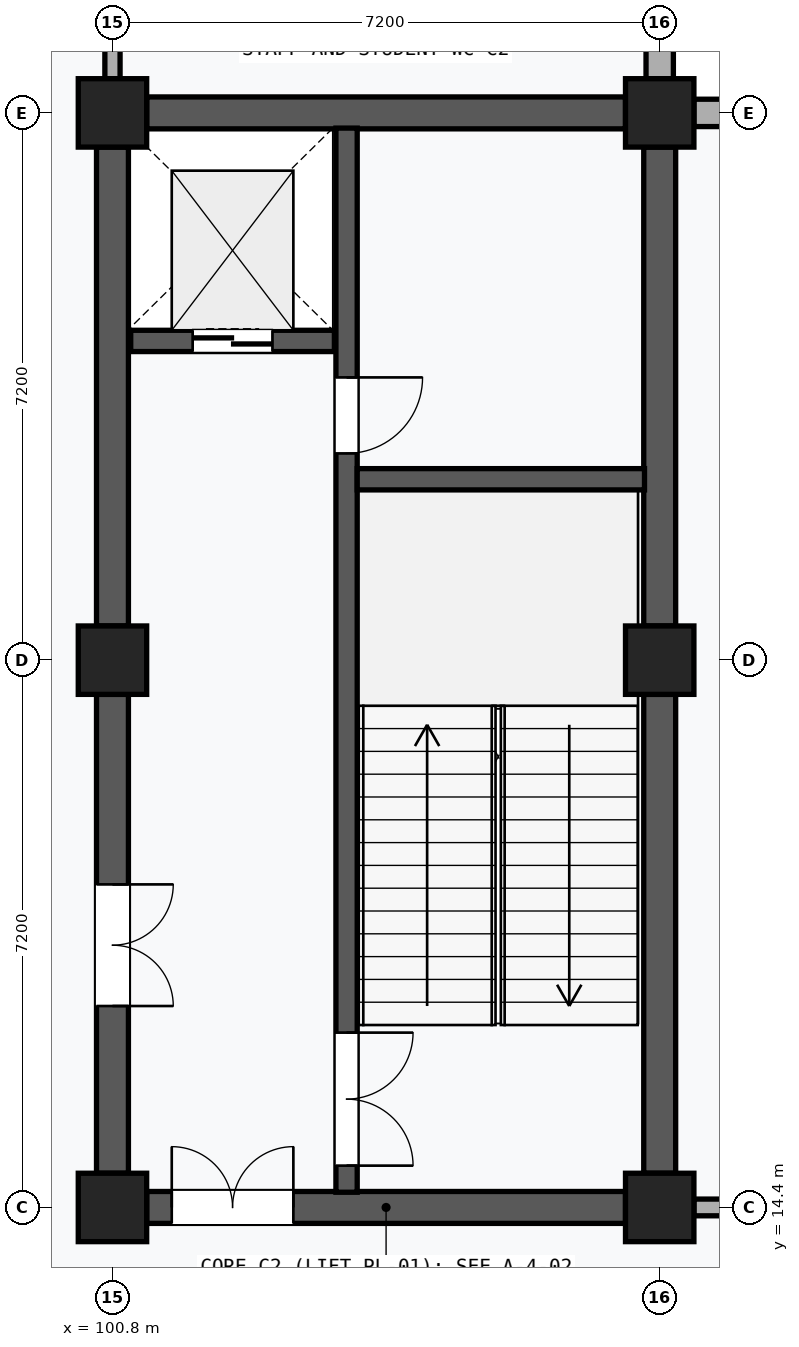
"""IFC4 building model, lengths in metres.
Left out: names, types, materials, properties, quantities, classifications, styles, units other than length and angle.
Written with IfcOpenShell. Run it as: python <this file> out.ifc"""

import sys

from ifc_helpers import new_model, si_unit, direction, frame, frame_2d, origin, origin_2d, place, context, subcontext, project, spatial, rectangle, extrude, element, fill, save


model = new_model("IFC4")
c1 = context("Model", 3, precision=1e-05, world=origin(), true_north=direction((0.0, 1.0)))
c2 = subcontext(c1, "Body", "Model", "MODEL_VIEW")
j1 = project(units=[si_unit("LENGTHUNIT", "METRE"), si_unit("PLANEANGLEUNIT", "RADIAN")], contexts=[c1])
p1 = place(None, origin())
s1 = spatial("IfcSite", under=j1, at=p1, CompositionType="ELEMENT")
p2 = place(p1, origin())
s2 = spatial("IfcBuilding", under=s1, at=p2, CompositionType="ELEMENT")
p3 = place(p2, frame((0.0, 0.0, 4.8)))
s3 = spatial("IfcBuildingStorey", under=s2, at=p3, CompositionType="ELEMENT", Elevation=4.8)
for number, where, z_axis, x_axis in (
    (1, (100.8, 14.4, 0.0), (0.0, 0.0, 1.0), (1.0, 0.0, 0.0)),
    (2, (100.8, 21.6, 0.0), (0.0, 0.0, 1.0), (1.0, 0.0, 0.0)),
    (3, (100.8, 28.8, 0.0), (0.0, 0.0, 1.0), (1.0, 0.0, 0.0)),
    (4, (108.0, 14.4, 0.0), (0.0, 0.0, 1.0), (1.0, 0.0, 0.0)),
    (5, (108.0, 21.6, 0.0), (0.0, 0.0, 1.0), (1.0, 0.0, 0.0)),
    (6, (108.0, 28.8, 0.0), (0.0, 0.0, 1.0), (1.0, 0.0, 0.0)),
):
    element("IfcColumn", number, at=place(p3, frame(where, z_axis=z_axis, x_axis=x_axis)), inside=s3, PredefinedType="COLUMN", context=c2, shape_type="SweptSolid", body=[
        extrude(rectangle(XDim=0.9, YDim=0.9, at=origin_2d()), origin(), (0.0, 0.0, 1.0), 4.8),
    ])
p4 = place(p3, frame((108.0, 29.25, 0.0), z_axis=(0.0, 0.0, 1.0), x_axis=(0.0, 1.0, 0.0)))
e7 = element("IfcWall", 7, at=p4, inside=s3, PredefinedType="SOLIDWALL", context=c2, shape_type="SweptSolid", body=[
    extrude(rectangle(XDim=6.375, YDim=0.36, at=frame_2d((3.188, 0.0))), origin(), (0.0, 0.0, 1.0), 3.85),
])
p5 = place(p4, frame((1.387, 0.0, 0.7)))
e8 = element("IfcOpeningElement", 8, at=p5, cuts=e7, PredefinedType="OPENING", context=c2, shape_type="SweptSolid", body=[
    extrude(rectangle(XDim=3.6, YDim=2.2, at=frame_2d((1.8, 1.1))), frame((0.0, 0.192, 0.0), z_axis=(0.0, -1.0, 0.0), x_axis=(1.0, 0.0, 0.0)), (0.0, 0.0, 1.0), 0.384),
])
p6 = place(p3, frame((108.45, 28.8, 0.0), z_axis=(0.0, 0.0, 1.0), x_axis=(1.0, 0.0, 0.0)))
e9 = element("IfcWall", 9, at=p6, inside=s3, PredefinedType="SOLIDWALL", context=c2, shape_type="SweptSolid", body=[
    extrude(rectangle(XDim=6.5, YDim=0.36, at=frame_2d((3.25, 0.0))), origin(), (0.0, 0.0, 1.0), 3.85),
])
p7 = place(p6, frame((1.45, 0.0, 0.7)))
e10 = element("IfcOpeningElement", 10, at=p7, cuts=e9, PredefinedType="OPENING", context=c2, shape_type="SweptSolid", body=[
    extrude(rectangle(XDim=3.6, YDim=2.2, at=frame_2d((1.8, 1.1))), frame((0.0, 0.192, 0.0), z_axis=(0.0, -1.0, 0.0), x_axis=(1.0, 0.0, 0.0)), (0.0, 0.0, 1.0), 0.384),
])
p8 = place(p3, frame((100.8, 14.85, 0.0), z_axis=(0.0, 0.0, 1.0), x_axis=(0.0, 1.0, 0.0)))
e11 = element("IfcWall", 11, at=p8, inside=s3, PredefinedType="SHEAR", context=c2, shape_type="SweptSolid", body=[
    extrude(rectangle(XDim=6.3, YDim=0.42, at=frame_2d((3.15, 0.0))), origin(), (0.0, 0.0, 1.0), 3.58),
])
p9 = place(p8, frame((2.2, 0.0, 0.0)))
e12 = element("IfcOpeningElement", 12, at=p9, cuts=e11, PredefinedType="OPENING", context=c2, shape_type="SweptSolid", body=[
    extrude(rectangle(XDim=1.6, YDim=2.2, at=frame_2d((0.8, 1.1))), frame((0.0, 0.222, 0.0), z_axis=(0.0, -1.0, 0.0), x_axis=(1.0, 0.0, 0.0)), (0.0, 0.0, 1.0), 0.444),
])
p10 = place(p3, frame((100.8, 22.05, 0.0), z_axis=(0.0, 0.0, 1.0), x_axis=(0.0, 1.0, 0.0)))
e13 = element("IfcWall", 13, at=p10, inside=s3, PredefinedType="SHEAR", context=c2, shape_type="SweptSolid", body=[
    extrude(rectangle(XDim=6.3, YDim=0.42, at=frame_2d((3.15, 0.0))), origin(), (0.0, 0.0, 1.0), 3.58),
])
p11 = place(p3, frame((108.0, 14.85, 0.0), z_axis=(0.0, 0.0, 1.0), x_axis=(0.0, 1.0, 0.0)))
e14 = element("IfcWall", 14, at=p11, inside=s3, PredefinedType="SHEAR", context=c2, shape_type="SweptSolid", body=[
    extrude(rectangle(XDim=6.3, YDim=0.42, at=frame_2d((3.15, 0.0))), origin(), (0.0, 0.0, 1.0), 3.58),
])
p12 = place(p3, frame((108.0, 22.05, 0.0), z_axis=(0.0, 0.0, 1.0), x_axis=(0.0, 1.0, 0.0)))
e15 = element("IfcWall", 15, at=p12, inside=s3, PredefinedType="SHEAR", context=c2, shape_type="SweptSolid", body=[
    extrude(rectangle(XDim=6.3, YDim=0.42, at=frame_2d((3.15, 0.0))), origin(), (0.0, 0.0, 1.0), 3.58),
])
p13 = place(p3, frame((101.25, 14.4, 0.0), z_axis=(0.0, 0.0, 1.0), x_axis=(1.0, 0.0, 0.0)))
e16 = element("IfcWall", 16, at=p13, inside=s3, PredefinedType="SHEAR", context=c2, shape_type="SweptSolid", body=[
    extrude(rectangle(XDim=6.3, YDim=0.42, at=frame_2d((3.15, 0.0))), origin(), (0.0, 0.0, 1.0), 3.58),
])
p14 = place(p13, frame((0.33, 0.0, 0.0)))
e17 = element("IfcOpeningElement", 17, at=p14, cuts=e16, PredefinedType="OPENING", context=c2, shape_type="SweptSolid", body=[
    extrude(rectangle(XDim=1.6, YDim=2.2, at=frame_2d((0.8, 1.1))), frame((0.0, 0.222, 0.0), z_axis=(0.0, -1.0, 0.0), x_axis=(1.0, 0.0, 0.0)), (0.0, 0.0, 1.0), 0.444),
])
p15 = place(p3, frame((101.25, 28.8, 0.0), z_axis=(0.0, 0.0, 1.0), x_axis=(1.0, 0.0, 0.0)))
e18 = element("IfcWall", 18, at=p15, inside=s3, PredefinedType="SHEAR", context=c2, shape_type="SweptSolid", body=[
    extrude(rectangle(XDim=6.3, YDim=0.42, at=frame_2d((3.15, 0.0))), origin(), (0.0, 0.0, 1.0), 3.58),
])
p16 = place(p3, frame((103.88, 14.6, 0.0), z_axis=(0.0, 0.0, 1.0), x_axis=(0.0, 1.0, 0.0)))
e19 = element("IfcWall", 19, at=p16, inside=s3, PredefinedType="SHEAR", context=c2, shape_type="SweptSolid", body=[
    extrude(rectangle(XDim=14.0, YDim=0.28, at=frame_2d((7.0, 0.0))), origin(), (0.0, 0.0, 1.0), 4.48),
])
p17 = place(p16, frame((0.35, 0.0, 0.0)))
e20 = element("IfcOpeningElement", 20, at=p17, cuts=e19, PredefinedType="OPENING", context=c2, shape_type="SweptSolid", body=[
    extrude(rectangle(XDim=1.75, YDim=2.15, at=frame_2d((0.875, 1.075))), frame((0.0, 0.152, 0.0), z_axis=(0.0, -1.0, 0.0), x_axis=(1.0, 0.0, 0.0)), (0.0, 0.0, 1.0), 0.304),
])
p18 = place(p16, frame((9.72, 0.0, 0.0)))
e21 = element("IfcOpeningElement", 21, at=p18, cuts=e19, PredefinedType="OPENING", context=c2, shape_type="SweptSolid", body=[
    extrude(rectangle(XDim=1.0, YDim=2.15, at=frame_2d((0.5, 1.075))), frame((0.0, 0.152, 0.0), z_axis=(0.0, -1.0, 0.0), x_axis=(1.0, 0.0, 0.0)), (0.0, 0.0, 1.0), 0.304),
])
p19 = place(p3, frame((104.02, 23.98, 0.0), z_axis=(0.0, 0.0, 1.0), x_axis=(1.0, 0.0, 0.0)))
e22 = element("IfcWall", 22, at=p19, inside=s3, PredefinedType="SHEAR", context=c2, shape_type="SweptSolid", body=[
    extrude(rectangle(XDim=3.78, YDim=0.28, at=frame_2d((1.89, 0.0))), origin(), (0.0, 0.0, 1.0), 4.48),
])
p20 = place(p3, frame((101.04, 25.8, 0.0), z_axis=(0.0, 0.0, 1.0), x_axis=(1.0, 0.0, 0.0)))
e23 = element("IfcWall", 23, at=p20, inside=s3, PredefinedType="SHEAR", context=c2, shape_type="SweptSolid", body=[
    extrude(rectangle(XDim=2.68, YDim=0.28, at=frame_2d((1.34, 0.0))), origin(), (0.0, 0.0, 1.0), 4.48),
])
p21 = place(p20, frame((0.815, 0.0, 0.0)))
e24 = element("IfcOpeningElement", 24, at=p21, cuts=e23, PredefinedType="OPENING", context=c2, shape_type="SweptSolid", body=[
    extrude(rectangle(XDim=1.05, YDim=2.2, at=frame_2d((0.525, 1.1))), frame((0.0, 0.152, 0.0), z_axis=(0.0, -1.0, 0.0), x_axis=(1.0, 0.0, 0.0)), (0.0, 0.0, 1.0), 0.304),
])
p22 = place(p3, frame((108.45, 14.4, 0.0), z_axis=(0.0, 0.0, 1.0), x_axis=(1.0, 0.0, 0.0)))
e25 = element("IfcWall", 25, at=p22, inside=s3, PredefinedType="PARTITIONING", context=c2, shape_type="SweptSolid", body=[
    extrude(rectangle(XDim=6.35, YDim=0.22, at=frame_2d((3.175, 0.0))), origin(), (0.0, 0.0, 1.0), 3.58),
])
p23 = place(p22, frame((2.675, 0.0, 0.0)))
e26 = element("IfcOpeningElement", 26, at=p23, cuts=e25, PredefinedType="OPENING", context=c2, shape_type="SweptSolid", body=[
    extrude(rectangle(XDim=1.0, YDim=2.1, at=frame_2d((0.5, 1.05))), frame((0.0, 0.122, 0.0), z_axis=(0.0, -1.0, 0.0), x_axis=(1.0, 0.0, 0.0)), (0.0, 0.0, 1.0), 0.244),
])
p24 = place(p3, frame((100.8, 29.25, 0.0), z_axis=(0.0, 0.0, 1.0), x_axis=(0.0, 1.0, 0.0)))
e27 = element("IfcWall", 27, at=p24, inside=s3, PredefinedType="PARTITIONING", context=c2, shape_type="SweptSolid", body=[
    extrude(rectangle(XDim=6.3, YDim=0.2, at=frame_2d((3.15, 0.0))), origin(), (0.0, 0.0, 1.0), 3.58),
])
p25 = place(p24, frame((2.63, 0.0, 0.0)))
e28 = element("IfcOpeningElement", 28, at=p25, cuts=e27, PredefinedType="OPENING", context=c2, shape_type="SweptSolid", body=[
    extrude(rectangle(XDim=1.04, YDim=2.14, at=frame_2d((0.52, 1.07))), frame((0.0, 0.112, 0.0), z_axis=(0.0, -1.0, 0.0), x_axis=(1.0, 0.0, 0.0)), (0.0, 0.0, 1.0), 0.224),
])
p26 = place(p9, frame((1.6, 0.0, 0.0), z_axis=(0.0, 0.0, 1.0), x_axis=(-1.0, 0.0, 0.0)))
e29 = element("IfcDoor", 29, at=p26, inside=s3, OperationType="DOUBLE_DOOR_SINGLE_SWING", PredefinedType="DOOR", context=c2, shape_type="SweptSolid", body=[
    extrude(rectangle(XDim=1.6, YDim=2.2, at=frame_2d((0.8, 1.1))), frame((0.0, 0.025, 0.0), z_axis=(0.0, -1.0, 0.0), x_axis=(1.0, 0.0, 0.0)), (0.0, 0.0, 1.0), 0.05),
])
fill(e12, e29)
p27 = place(p14, origin())
e30 = element("IfcDoor", 30, at=p27, inside=s3, OperationType="DOUBLE_DOOR_SINGLE_SWING", PredefinedType="DOOR", context=c2, shape_type="SweptSolid", body=[
    extrude(rectangle(XDim=1.6, YDim=2.2, at=frame_2d((0.8, 1.1))), frame((0.0, 0.025, 0.0), z_axis=(0.0, -1.0, 0.0), x_axis=(1.0, 0.0, 0.0)), (0.0, 0.0, 1.0), 0.05),
])
fill(e17, e30)
p28 = place(p17, frame((1.75, 0.0, 0.0), z_axis=(0.0, 0.0, 1.0), x_axis=(-1.0, 0.0, 0.0)))
e31 = element("IfcDoor", 31, at=p28, inside=s3, OperationType="DOUBLE_DOOR_SINGLE_SWING", PredefinedType="DOOR", context=c2, shape_type="SweptSolid", body=[
    extrude(rectangle(XDim=1.75, YDim=2.15, at=frame_2d((0.875, 1.075))), frame((0.0, 0.025, 0.0), z_axis=(0.0, -1.0, 0.0), x_axis=(1.0, 0.0, 0.0)), (0.0, 0.0, 1.0), 0.05),
])
fill(e20, e31)
p29 = place(p18, frame((1.0, 0.0, 0.0), z_axis=(0.0, 0.0, 1.0), x_axis=(-1.0, 0.0, 0.0)))
e32 = element("IfcDoor", 32, at=p29, inside=s3, OperationType="SINGLE_SWING_LEFT", PredefinedType="DOOR", context=c2, shape_type="SweptSolid", body=[
    extrude(rectangle(XDim=1.0, YDim=2.15, at=frame_2d((0.5, 1.075))), frame((0.0, 0.025, 0.0), z_axis=(0.0, -1.0, 0.0), x_axis=(1.0, 0.0, 0.0)), (0.0, 0.0, 1.0), 0.05),
])
fill(e21, e32)
p30 = place(p21, frame((1.05, 0.0, 0.0), z_axis=(0.0, 0.0, 1.0), x_axis=(-1.0, 0.0, 0.0)))
e33 = element("IfcDoor", 33, at=p30, inside=s3, OperationType="DOUBLE_DOOR_SLIDING", PredefinedType="DOOR", context=c2, shape_type="SweptSolid", body=[
    extrude(rectangle(XDim=1.05, YDim=2.2, at=frame_2d((0.525, 1.1))), frame((0.0, 0.025, 0.0), z_axis=(0.0, -1.0, 0.0), x_axis=(1.0, 0.0, 0.0)), (0.0, 0.0, 1.0), 0.05),
])
fill(e24, e33)
save(model, sys.argv[1])
